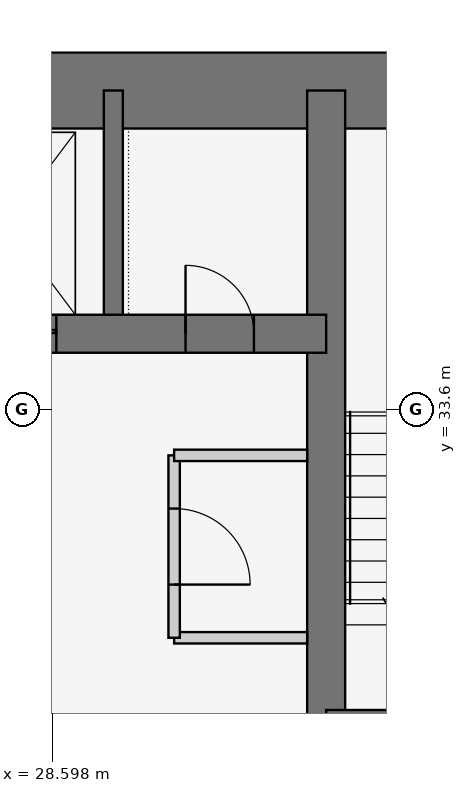
"""IFC4 building model, lengths in metres.
Left out: names, types, materials, properties, quantities, classifications, styles, units other than length and angle.
Written with IfcOpenShell. Run it as: python <this file> out.ifc"""

import sys

from ifc_helpers import new_model, si_unit, direction, frame, frame_2d, origin, place, context, subcontext, project, spatial, rectangle, extrude, element, fill, save


model = new_model("IFC4")
c1 = context("Model", 3, precision=1e-05, world=origin(), true_north=direction((0.0, 1.0)))
c2 = subcontext(c1, "Body", "Model", "MODEL_VIEW")
j1 = project(units=[si_unit("LENGTHUNIT", "METRE"), si_unit("PLANEANGLEUNIT", "RADIAN")], contexts=[c1])
p1 = place(None, origin())
s1 = spatial("IfcSite", under=j1, at=p1, CompositionType="ELEMENT")
p2 = place(p1, origin())
s2 = spatial("IfcBuilding", under=s1, at=p2, CompositionType="ELEMENT")
p3 = place(p2, frame((0.0, 0.0, 88.5)))
s3 = spatial("IfcBuildingStorey", under=s2, at=p3, CompositionType="ELEMENT", Elevation=88.5)
p4 = place(p3, frame((37.8, 37.8, 0.0), z_axis=(0.0, 0.0, 1.0), x_axis=(-1.0, 0.0, 0.0)))
e1 = element("IfcWall", 1, at=p4, inside=s3, PredefinedType="SHEAR", context=c2, shape_type="SweptSolid", body=[
    extrude(rectangle(XDim=17.3, YDim=1.0, at=frame_2d((8.65, 0.0))), origin(), (0.0, 0.0, 1.0), 3.6),
])
p5 = place(p3, frame((21.0, 34.6, 0.0), z_axis=(0.0, 0.0, 1.0), x_axis=(1.0, 0.0, 0.0)))
e2 = element("IfcWall", 2, at=p5, inside=s3, PredefinedType="SHEAR", context=c2, shape_type="SweptSolid", body=[
    extrude(rectangle(XDim=11.2, YDim=0.5, at=frame_2d((5.6, 0.0))), origin(), (0.0, 0.0, 1.0), 3.6),
])
p6 = place(p5, frame((9.35, 0.0, 0.0)))
e3 = element("IfcOpeningElement", 3, at=p6, cuts=e2, PredefinedType="OPENING", context=c2, shape_type="SweptSolid", body=[
    extrude(rectangle(XDim=0.9, YDim=2.1, at=frame_2d((0.45, 1.05))), frame((0.0, 0.26, 0.0), z_axis=(0.0, -1.0, 0.0), x_axis=(1.0, 0.0, 0.0)), (0.0, 0.0, 1.0), 0.52),
])
p7 = place(p5, frame((1.0, 0.0, 0.0)))
e4 = element("IfcOpeningElement", 4, at=p7, cuts=e2, PredefinedType="OPENING", context=c2, shape_type="SweptSolid", body=[
    extrude(rectangle(XDim=1.1, YDim=2.1, at=frame_2d((0.55, 1.05))), frame((0.0, 0.26, 0.0), z_axis=(0.0, -1.0, 0.0), x_axis=(1.0, 0.0, 0.0)), (0.0, 0.0, 1.0), 0.52),
])
p8 = place(p5, frame((3.65, 0.0, 0.0)))
e5 = element("IfcOpeningElement", 5, at=p8, cuts=e2, PredefinedType="OPENING", context=c2, shape_type="SweptSolid", body=[
    extrude(rectangle(XDim=1.1, YDim=2.1, at=frame_2d((0.55, 1.05))), frame((0.0, 0.26, 0.0), z_axis=(0.0, -1.0, 0.0), x_axis=(1.0, 0.0, 0.0)), (0.0, 0.0, 1.0), 0.52),
])
p9 = place(p5, frame((6.35, 0.0, 0.0)))
e6 = element("IfcOpeningElement", 6, at=p9, cuts=e2, PredefinedType="OPENING", context=c2, shape_type="SweptSolid", body=[
    extrude(rectangle(XDim=1.3, YDim=2.1, at=frame_2d((0.65, 1.05))), frame((0.0, 0.26, 0.0), z_axis=(0.0, -1.0, 0.0), x_axis=(1.0, 0.0, 0.0)), (0.0, 0.0, 1.0), 0.52),
])
p10 = place(p3, frame((32.2, 29.15, 0.0), z_axis=(0.0, 0.0, 1.0), x_axis=(0.0, 1.0, 0.0)))
e7 = element("IfcWall", 7, at=p10, inside=s3, PredefinedType="SHEAR", context=c2, shape_type="SweptSolid", body=[
    extrude(rectangle(XDim=8.65, YDim=0.5, at=frame_2d((4.325, 0.0))), origin(), (0.0, 0.0, 1.0), 3.6),
])
p11 = place(p3, frame((32.2, 29.4, 0.0), z_axis=(0.0, 0.0, 1.0), x_axis=(1.0, 0.0, 0.0)))
e8 = element("IfcWall", 8, at=p11, inside=s3, PredefinedType="SHEAR", context=c2, shape_type="SweptSolid", body=[
    extrude(rectangle(XDim=5.6, YDim=0.5, at=frame_2d((2.8, 0.0))), origin(), (0.0, 0.0, 1.0), 3.6),
])
p12 = place(p11, frame((2.0, 0.0, 0.0)))
e9 = element("IfcOpeningElement", 9, at=p12, cuts=e8, PredefinedType="OPENING", context=c2, shape_type="SweptSolid", body=[
    extrude(rectangle(XDim=1.2, YDim=2.1, at=frame_2d((0.6, 1.05))), frame((0.0, 0.26, 0.0), z_axis=(0.0, -1.0, 0.0), x_axis=(1.0, 0.0, 0.0)), (0.0, 0.0, 1.0), 0.52),
])
p13 = place(p3, frame((29.4, 34.6, 0.0), z_axis=(0.0, 0.0, 1.0), x_axis=(0.0, 1.0, 0.0)))
e10 = element("IfcWall", 10, at=p13, inside=s3, PredefinedType="SHEAR", context=c2, shape_type="SweptSolid", body=[
    extrude(rectangle(XDim=3.2, YDim=0.25, at=frame_2d((1.6, 0.0))), origin(), (0.0, 0.0, 1.0), 3.6),
])
p14 = place(p3, frame((31.95, 30.6, 0.0), z_axis=(0.0, 0.0, 1.0), x_axis=(-1.0, 0.0, 0.0)))
e11 = element("IfcWall", 11, at=p14, inside=s3, PredefinedType="PARTITIONING", context=c2, shape_type="SweptSolid", body=[
    extrude(rectangle(XDim=1.75, YDim=0.15, at=frame_2d((0.875, 0.0))), origin(), (0.0, 0.0, 1.0), 3.45),
])
p15 = place(p3, frame((30.2, 30.6, 0.0), z_axis=(0.0, 0.0, 1.0), x_axis=(0.0, 1.0, 0.0)))
e12 = element("IfcWall", 12, at=p15, inside=s3, PredefinedType="PARTITIONING", context=c2, shape_type="SweptSolid", body=[
    extrude(rectangle(XDim=2.4, YDim=0.15, at=frame_2d((1.2, 0.0))), origin(), (0.0, 0.0, 1.0), 3.45),
])
p16 = place(p15, frame((0.7, 0.0, 0.0)))
e13 = element("IfcOpeningElement", 13, at=p16, cuts=e12, PredefinedType="OPENING", context=c2, shape_type="SweptSolid", body=[
    extrude(rectangle(XDim=1.0, YDim=2.1, at=frame_2d((0.5, 1.05))), frame((0.0, 0.085, 0.0), z_axis=(0.0, -1.0, 0.0), x_axis=(1.0, 0.0, 0.0)), (0.0, 0.0, 1.0), 0.17),
])
p17 = place(p3, frame((30.2, 33.0, 0.0), z_axis=(0.0, 0.0, 1.0), x_axis=(1.0, 0.0, 0.0)))
e14 = element("IfcWall", 14, at=p17, inside=s3, PredefinedType="PARTITIONING", context=c2, shape_type="SweptSolid", body=[
    extrude(rectangle(XDim=1.75, YDim=0.15, at=frame_2d((0.875, 0.0))), origin(), (0.0, 0.0, 1.0), 3.45),
])
p18 = place(p6, origin())
e15 = element("IfcDoor", 15, at=p18, inside=s3, OperationType="SINGLE_SWING_LEFT", PredefinedType="DOOR", context=c2, shape_type="SweptSolid", body=[
    extrude(rectangle(XDim=0.9, YDim=2.1, at=frame_2d((0.45, 1.05))), frame((0.0, 0.025, 0.0), z_axis=(0.0, -1.0, 0.0), x_axis=(1.0, 0.0, 0.0)), (0.0, 0.0, 1.0), 0.05),
])
fill(e3, e15)
p19 = place(p16, frame((1.0, 0.0, 0.0), z_axis=(0.0, 0.0, 1.0), x_axis=(-1.0, 0.0, 0.0)))
e16 = element("IfcDoor", 16, at=p19, inside=s3, OperationType="SINGLE_SWING_RIGHT", PredefinedType="DOOR", context=c2, shape_type="SweptSolid", body=[
    extrude(rectangle(XDim=1.0, YDim=2.1, at=frame_2d((0.5, 1.05))), frame((0.0, 0.025, 0.0), z_axis=(0.0, -1.0, 0.0), x_axis=(1.0, 0.0, 0.0)), (0.0, 0.0, 1.0), 0.05),
])
fill(e13, e16)
p20 = place(p9, origin())
e17 = element("IfcDoor", 17, at=p20, inside=s3, OperationType="DOUBLE_DOOR_SLIDING", PredefinedType="DOOR", context=c2, shape_type="SweptSolid", body=[
    extrude(rectangle(XDim=1.3, YDim=2.1, at=frame_2d((0.65, 1.05))), frame((0.0, 0.025, 0.0), z_axis=(0.0, -1.0, 0.0), x_axis=(1.0, 0.0, 0.0)), (0.0, 0.0, 1.0), 0.05),
])
fill(e6, e17)
save(model, sys.argv[1])
